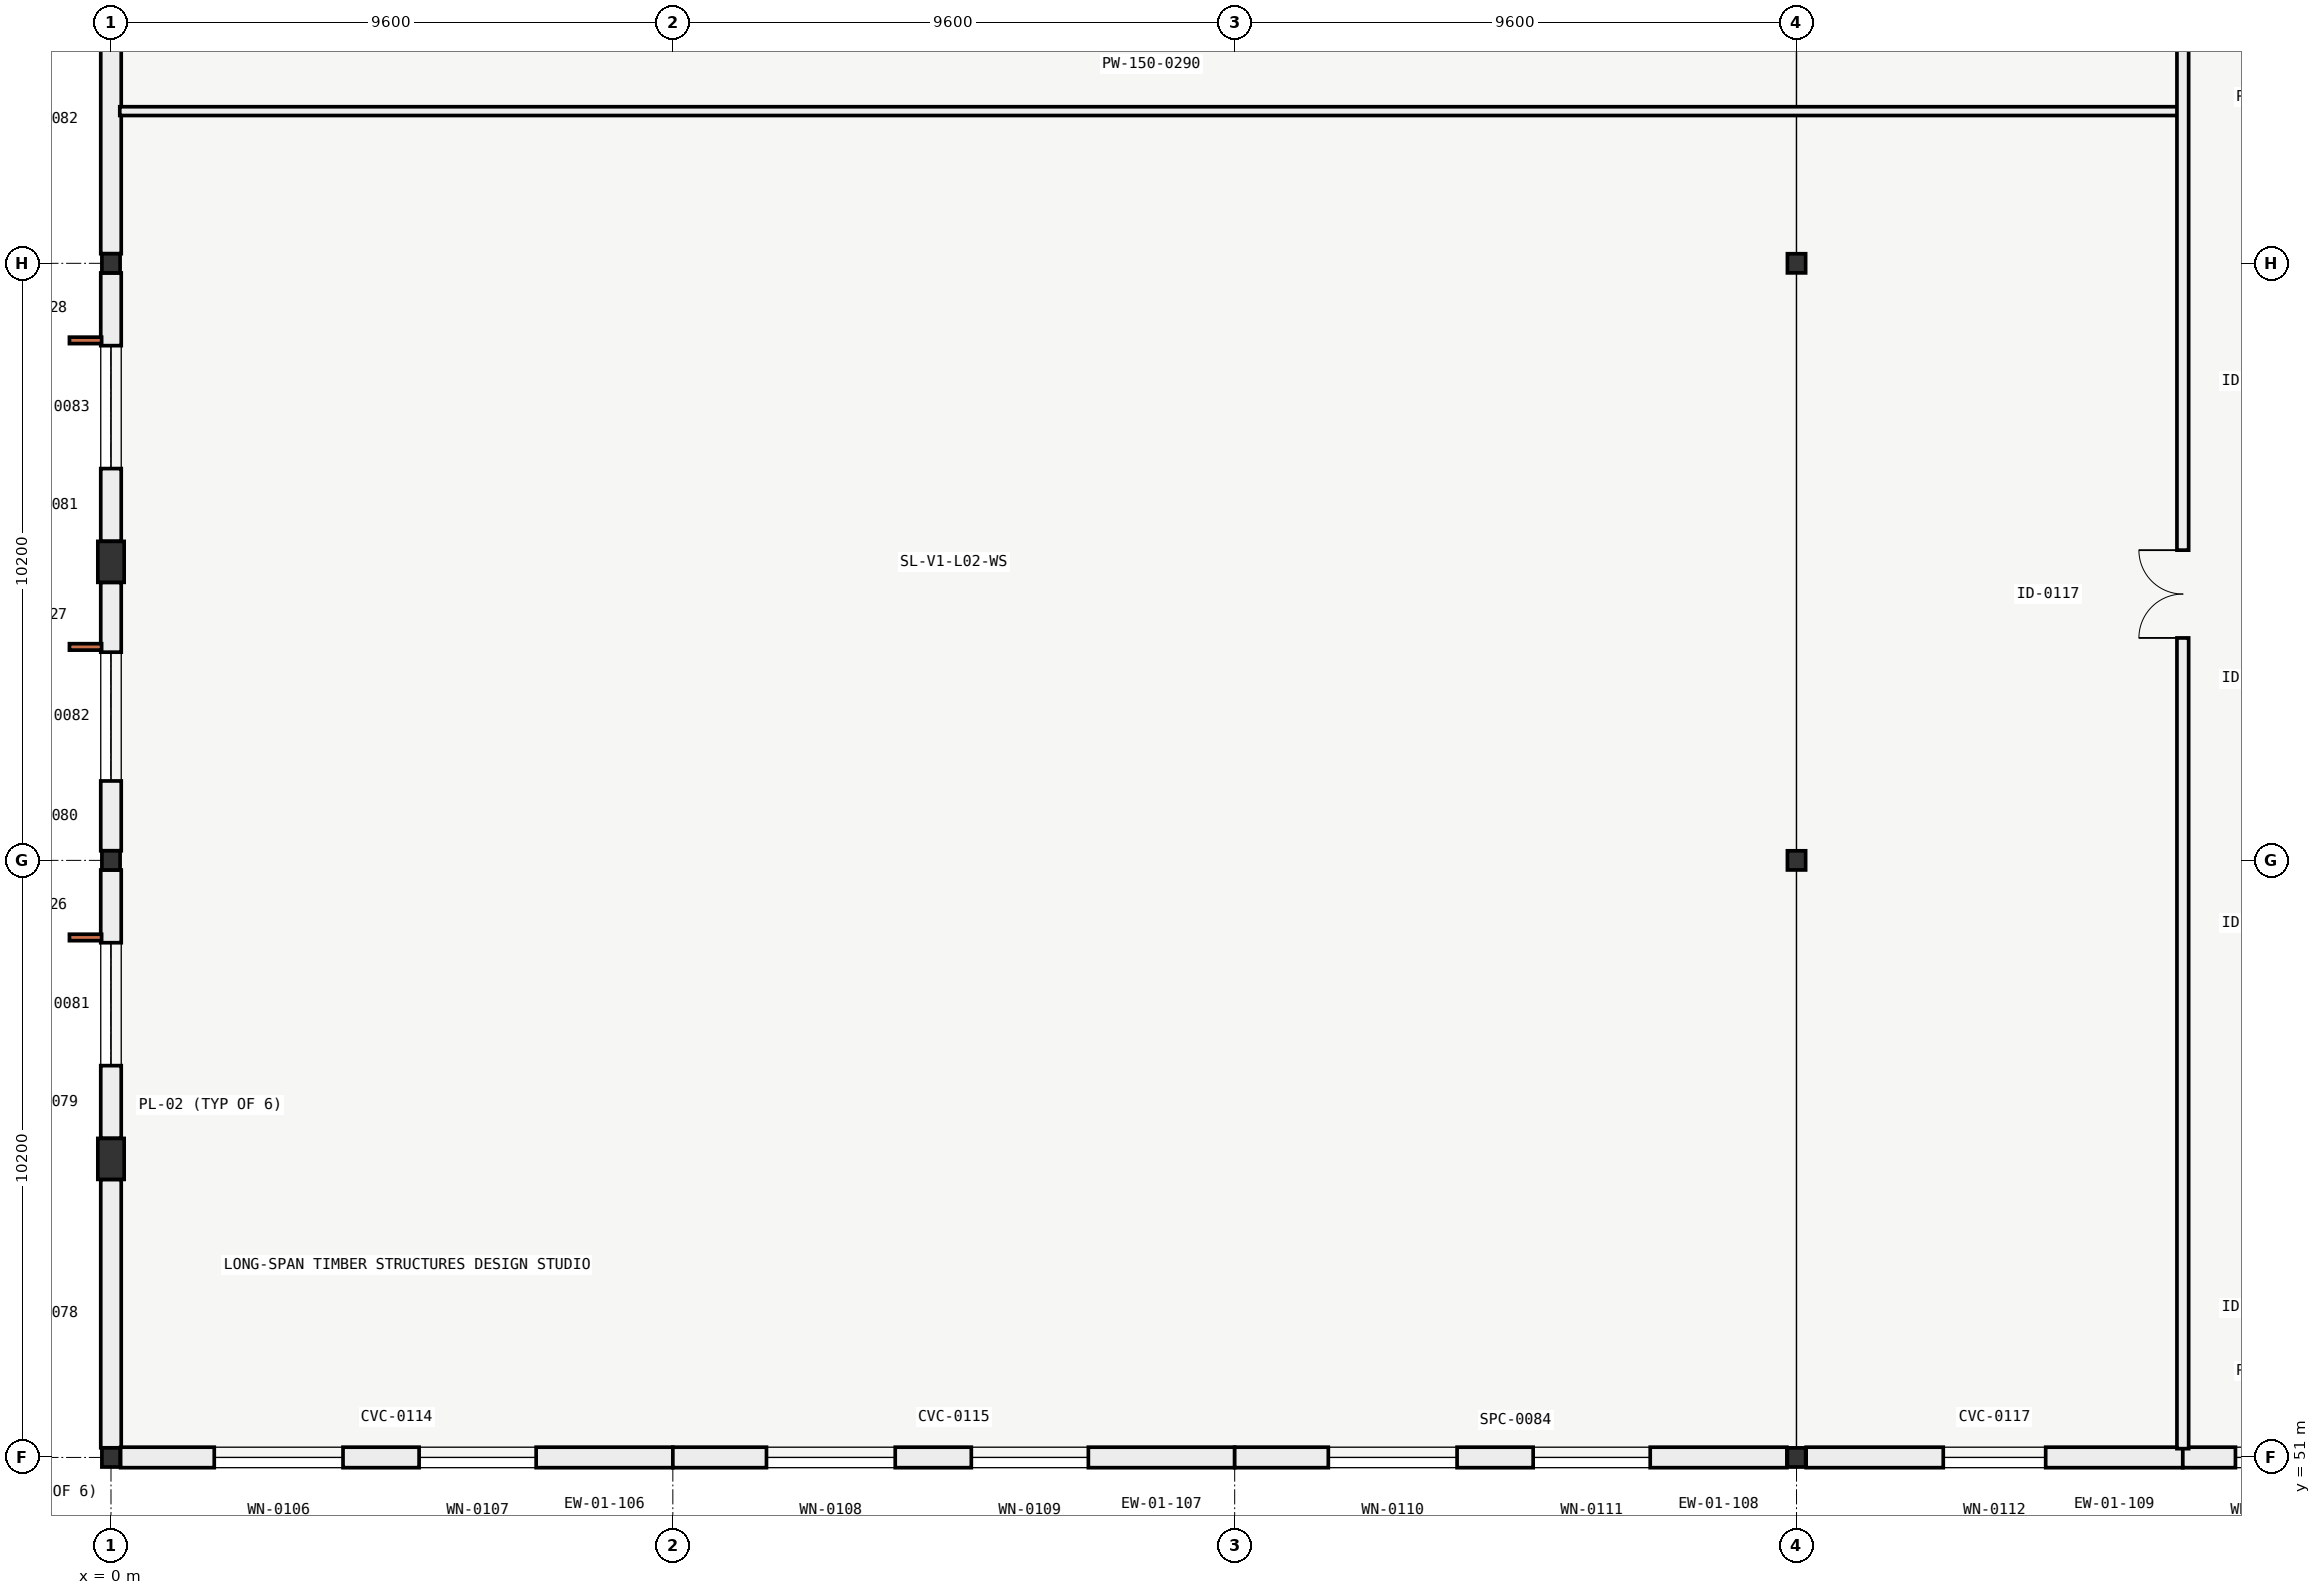
"""IFC4 building model, lengths in metres.
Left out: names, types, materials, properties, quantities, classifications, styles, units other than length and angle.
Written with IfcOpenShell. Run it as: python <this file> out.ifc"""

import sys

from ifc_helpers import new_model, si_unit, direction, frame, frame_2d, origin, origin_2d, place, context, subcontext, project, spatial, rectangle, i_section, extrude, element, fill, save


model = new_model("IFC4")
c1 = context("Model", 3, precision=1e-05, world=origin(), true_north=direction((0.0, 1.0)))
c2 = subcontext(c1, "Body", "Model", "MODEL_VIEW")
j1 = project(units=[si_unit("LENGTHUNIT", "METRE"), si_unit("PLANEANGLEUNIT", "RADIAN")], contexts=[c1])
p1 = place(None, origin())
s1 = spatial("IfcSite", under=j1, at=p1, CompositionType="ELEMENT")
p2 = place(p1, origin())
s2 = spatial("IfcBuilding", under=s1, at=p2, CompositionType="ELEMENT")
p3 = place(p2, frame((0.0, 0.0, 9.6)))
s3 = spatial("IfcBuildingStorey", under=s2, at=p3, CompositionType="ELEMENT", Elevation=9.6)
for number, where, z_axis, x_axis in (
    (1, (0.0, 51.0, 0.0), (0.0, 0.0, 1.0), (1.0, 0.0, 0.0)),
    (2, (28.8, 51.0, 0.0), (0.0, 0.0, 1.0), (1.0, 0.0, 0.0)),
    (3, (0.0, 61.2, 0.0), (0.0, 0.0, 1.0), (1.0, 0.0, 0.0)),
    (4, (28.8, 61.2, 0.0), (0.0, 0.0, 1.0), (1.0, 0.0, 0.0)),
    (5, (0.0, 71.4, 0.0), (0.0, 0.0, 1.0), (1.0, 0.0, 0.0)),
    (6, (28.8, 71.4, 0.0), (0.0, 0.0, 1.0), (1.0, 0.0, 0.0)),
):
    element("IfcColumn", number, at=place(p3, frame(where, z_axis=z_axis, x_axis=x_axis)), inside=s3, PredefinedType="COLUMN", context=c2, shape_type="SweptSolid", body=[
        extrude(i_section(OverallWidth=0.311, OverallDepth=0.327, WebThickness=0.016, FlangeThickness=0.025, FilletRadius=0.017, at=origin_2d()), origin(), (0.0, 0.0, 1.0), 4.2),
    ])
for number, where, z_axis, x_axis in (
    (7, (0.0, 56.1, 0.0), (0.0, 0.0, 1.0), (1.0, 0.0, 0.0)),
    (8, (0.0, 66.3, 0.0), (0.0, 0.0, 1.0), (1.0, 0.0, 0.0)),
):
    element("IfcColumn", number, at=place(p3, frame(where, z_axis=z_axis, x_axis=x_axis)), inside=s3, PredefinedType="PILASTER", context=c2, shape_type="SweptSolid", body=[
        extrude(rectangle(XDim=0.45, YDim=0.7, at=origin_2d()), origin(), (0.0, 0.0, 1.0), 4.2),
    ])
p4 = place(p3, frame((0.0, 51.165, 0.0), z_axis=(0.0, 0.0, 1.0), x_axis=(0.0, 1.0, 0.0)))
e9 = element("IfcWall", 9, at=p4, inside=s3, PredefinedType="SOLIDWALL", context=c2, shape_type="SweptSolid", body=[
    extrude(rectangle(XDim=4.584, YDim=0.35, at=frame_2d((2.292, 0.0))), origin(), (0.0, 0.0, 1.0), 3.48),
])
p5 = place(p3, frame((0.0, 56.451, 0.0), z_axis=(0.0, 0.0, 1.0), x_axis=(0.0, 1.0, 0.0)))
e10 = element("IfcWall", 10, at=p5, inside=s3, PredefinedType="SOLIDWALL", context=c2, shape_type="SweptSolid", body=[
    extrude(rectangle(XDim=4.584, YDim=0.35, at=frame_2d((2.292, 0.0))), origin(), (0.0, 0.0, 1.0), 3.48),
])
p6 = place(p5, frame((1.242, 0.0, 0.85)))
e11 = element("IfcOpeningElement", 11, at=p6, cuts=e10, PredefinedType="OPENING", context=c2, shape_type="SweptSolid", body=[
    extrude(rectangle(XDim=2.1, YDim=2.4, at=frame_2d((1.05, 1.2))), frame((0.0, 0.185, 0.0), z_axis=(0.0, -1.0, 0.0), x_axis=(1.0, 0.0, 0.0)), (0.0, 0.0, 1.0), 0.37),
])
p7 = place(p3, frame((0.0, 61.365, 0.0), z_axis=(0.0, 0.0, 1.0), x_axis=(0.0, 1.0, 0.0)))
e12 = element("IfcWall", 12, at=p7, inside=s3, PredefinedType="SOLIDWALL", context=c2, shape_type="SweptSolid", body=[
    extrude(rectangle(XDim=4.584, YDim=0.35, at=frame_2d((2.292, 0.0))), origin(), (0.0, 0.0, 1.0), 3.48),
])
p8 = place(p7, frame((1.192, 0.0, 0.85)))
e13 = element("IfcOpeningElement", 13, at=p8, cuts=e12, PredefinedType="OPENING", context=c2, shape_type="SweptSolid", body=[
    extrude(rectangle(XDim=2.2, YDim=2.3, at=frame_2d((1.1, 1.15))), frame((0.0, 0.185, 0.0), z_axis=(0.0, -1.0, 0.0), x_axis=(1.0, 0.0, 0.0)), (0.0, 0.0, 1.0), 0.37),
])
p9 = place(p3, frame((0.0, 66.651, 0.0), z_axis=(0.0, 0.0, 1.0), x_axis=(0.0, 1.0, 0.0)))
e14 = element("IfcWall", 14, at=p9, inside=s3, PredefinedType="SOLIDWALL", context=c2, shape_type="SweptSolid", body=[
    extrude(rectangle(XDim=4.585, YDim=0.35, at=frame_2d((2.292, 0.0))), origin(), (0.0, 0.0, 1.0), 3.48),
])
p10 = place(p9, frame((1.242, 0.0, 0.85)))
e15 = element("IfcOpeningElement", 15, at=p10, cuts=e14, PredefinedType="OPENING", context=c2, shape_type="SweptSolid", body=[
    extrude(rectangle(XDim=2.1, YDim=2.4, at=frame_2d((1.05, 1.2))), frame((0.0, 0.185, 0.0), z_axis=(0.0, -1.0, 0.0), x_axis=(1.0, 0.0, 0.0)), (0.0, 0.0, 1.0), 0.37),
])
p11 = place(p3, frame((0.0, 71.564, 0.0), z_axis=(0.0, 0.0, 1.0), x_axis=(0.0, 1.0, 0.0)))
e16 = element("IfcWall", 16, at=p11, inside=s3, PredefinedType="SOLIDWALL", context=c2, shape_type="SweptSolid", body=[
    extrude(rectangle(XDim=4.584, YDim=0.35, at=frame_2d((2.292, 0.0))), origin(), (0.0, 0.0, 1.0), 3.48),
])
p12 = place(p3, frame((9.6, 51.0, 0.0), z_axis=(0.0, 0.0, 1.0), x_axis=(-1.0, 0.0, 0.0)))
e17 = element("IfcWall", 17, at=p12, inside=s3, PredefinedType="SOLIDWALL", context=c2, shape_type="SweptSolid", body=[
    extrude(rectangle(XDim=9.436, YDim=0.35, at=frame_2d((4.718, 0.0))), origin(), (0.0, 0.0, 1.0), 3.32),
])
p13 = place(p12, frame((5.635, 0.0, 0.85)))
e18 = element("IfcOpeningElement", 18, at=p13, cuts=e17, PredefinedType="OPENING", context=c2, shape_type="SweptSolid", body=[
    extrude(rectangle(XDim=2.2, YDim=2.3, at=frame_2d((1.1, 1.15))), frame((0.0, 0.185, 0.0), z_axis=(0.0, -1.0, 0.0), x_axis=(1.0, 0.0, 0.0)), (0.0, 0.0, 1.0), 0.37),
])
p14 = place(p12, frame((2.335, 0.0, 0.85)))
e19 = element("IfcOpeningElement", 19, at=p14, cuts=e17, PredefinedType="OPENING", context=c2, shape_type="SweptSolid", body=[
    extrude(rectangle(XDim=2.0, YDim=1.35, at=frame_2d((1.0, 0.675))), frame((0.0, 0.185, 0.0), z_axis=(0.0, -1.0, 0.0), x_axis=(1.0, 0.0, 0.0)), (0.0, 0.0, 1.0), 0.37),
])
p15 = place(p3, frame((19.2, 51.0, 0.0), z_axis=(0.0, 0.0, 1.0), x_axis=(-1.0, 0.0, 0.0)))
e20 = element("IfcWall", 20, at=p15, inside=s3, PredefinedType="SOLIDWALL", context=c2, shape_type="SweptSolid", body=[
    extrude(rectangle(XDim=9.6, YDim=0.35, at=frame_2d((4.8, 0.0))), origin(), (0.0, 0.0, 1.0), 3.32),
])
p16 = place(p15, frame((5.8, 0.0, 0.85)))
e21 = element("IfcOpeningElement", 21, at=p16, cuts=e20, PredefinedType="OPENING", context=c2, shape_type="SweptSolid", body=[
    extrude(rectangle(XDim=2.2, YDim=2.3, at=frame_2d((1.1, 1.15))), frame((0.0, 0.185, 0.0), z_axis=(0.0, -1.0, 0.0), x_axis=(1.0, 0.0, 0.0)), (0.0, 0.0, 1.0), 0.37),
])
p17 = place(p15, frame((2.5, 0.0, 0.85)))
e22 = element("IfcOpeningElement", 22, at=p17, cuts=e20, PredefinedType="OPENING", context=c2, shape_type="SweptSolid", body=[
    extrude(rectangle(XDim=2.0, YDim=1.35, at=frame_2d((1.0, 0.675))), frame((0.0, 0.185, 0.0), z_axis=(0.0, -1.0, 0.0), x_axis=(1.0, 0.0, 0.0)), (0.0, 0.0, 1.0), 0.37),
])
p18 = place(p3, frame((28.635, 51.0, 0.0), z_axis=(0.0, 0.0, 1.0), x_axis=(-1.0, 0.0, 0.0)))
e23 = element("IfcWall", 23, at=p18, inside=s3, PredefinedType="SOLIDWALL", context=c2, shape_type="SweptSolid", body=[
    extrude(rectangle(XDim=9.436, YDim=0.35, at=frame_2d((4.718, 0.0))), origin(), (0.0, 0.0, 1.0), 3.32),
])
p19 = place(p18, frame((5.635, 0.0, 0.85)))
e24 = element("IfcOpeningElement", 24, at=p19, cuts=e23, PredefinedType="OPENING", context=c2, shape_type="SweptSolid", body=[
    extrude(rectangle(XDim=2.2, YDim=2.3, at=frame_2d((1.1, 1.15))), frame((0.0, 0.185, 0.0), z_axis=(0.0, -1.0, 0.0), x_axis=(1.0, 0.0, 0.0)), (0.0, 0.0, 1.0), 0.37),
])
p20 = place(p18, frame((2.335, 0.0, 0.85)))
e25 = element("IfcOpeningElement", 25, at=p20, cuts=e23, PredefinedType="OPENING", context=c2, shape_type="SweptSolid", body=[
    extrude(rectangle(XDim=2.0, YDim=1.35, at=frame_2d((1.0, 0.675))), frame((0.0, 0.185, 0.0), z_axis=(0.0, -1.0, 0.0), x_axis=(1.0, 0.0, 0.0)), (0.0, 0.0, 1.0), 0.37),
])
p21 = place(p3, frame((35.4, 51.0, 0.0), z_axis=(0.0, 0.0, 1.0), x_axis=(-1.0, 0.0, 0.0)))
e26 = element("IfcWall", 26, at=p21, inside=s3, PredefinedType="SOLIDWALL", context=c2, shape_type="SweptSolid", body=[
    extrude(rectangle(XDim=6.435, YDim=0.35, at=frame_2d((3.218, 0.0))), origin(), (0.0, 0.0, 1.0), 3.32),
])
p22 = place(p21, frame((2.343, 0.0, 0.9)))
e27 = element("IfcOpeningElement", 27, at=p22, cuts=e26, PredefinedType="OPENING", context=c2, shape_type="SweptSolid", body=[
    extrude(rectangle(XDim=1.75, YDim=2.05, at=frame_2d((0.875, 1.025))), frame((0.0, 0.185, 0.0), z_axis=(0.0, -1.0, 0.0), x_axis=(1.0, 0.0, 0.0)), (0.0, 0.0, 1.0), 0.37),
])
p23 = place(p3, frame((38.099, 51.0, 0.0), z_axis=(0.0, 0.0, 1.0), x_axis=(-1.0, 0.0, 0.0)))
e28 = element("IfcWall", 28, at=p23, inside=s3, PredefinedType="SOLIDWALL", context=c2, shape_type="SweptSolid", body=[
    extrude(rectangle(XDim=2.699, YDim=0.35, at=frame_2d((1.35, 0.0))), origin(), (0.0, 0.0, 1.0), 3.32),
])
p24 = place(p23, frame((0.899, 0.0, 0.85)))
e29 = element("IfcOpeningElement", 29, at=p24, cuts=e28, PredefinedType="OPENING", context=c2, shape_type="SweptSolid", body=[
    extrude(rectangle(XDim=0.9, YDim=2.2, at=frame_2d((0.45, 1.1))), frame((0.0, 0.185, 0.0), z_axis=(0.0, -1.0, 0.0), x_axis=(1.0, 0.0, 0.0)), (0.0, 0.0, 1.0), 0.37),
])
p25 = place(p3, frame((0.15, 74.0, 0.0), z_axis=(0.0, 0.0, 1.0), x_axis=(1.0, 0.0, 0.0)))
e30 = element("IfcWall", 30, at=p25, inside=s3, PredefinedType="PARTITIONING", context=c2, shape_type="SweptSolid", body=[
    extrude(rectangle(XDim=35.25, YDim=0.15, at=frame_2d((17.625, 0.0))), origin(), (0.0, 0.0, 1.0), 3.48),
])
p26 = place(p3, frame((35.4, 51.15, 0.0), z_axis=(0.0, 0.0, 1.0), x_axis=(0.0, 1.0, 0.0)))
e31 = element("IfcWall", 31, at=p26, inside=s3, PredefinedType="PARTITIONING", context=c2, shape_type="SweptSolid", body=[
    extrude(rectangle(XDim=71.1, YDim=0.2, at=frame_2d((35.55, 0.0))), origin(), (0.0, 0.0, 1.0), 3.61),
])
p27 = place(p26, frame((13.85, 0.0, 0.0)))
e32 = element("IfcOpeningElement", 32, at=p27, cuts=e31, PredefinedType="OPENING", context=c2, shape_type="SweptSolid", body=[
    extrude(rectangle(XDim=1.5, YDim=2.2, at=frame_2d((0.75, 1.1))), frame((0.0, 0.11, 0.0), z_axis=(0.0, -1.0, 0.0), x_axis=(1.0, 0.0, 0.0)), (0.0, 0.0, 1.0), 0.22),
])
p28 = place(p26, frame((35.35, 0.0, 0.0)))
e33 = element("IfcOpeningElement", 33, at=p28, cuts=e31, PredefinedType="OPENING", context=c2, shape_type="SweptSolid", body=[
    extrude(rectangle(XDim=2.0, YDim=2.4, at=frame_2d((1.0, 1.2))), frame((0.0, 0.11, 0.0), z_axis=(0.0, -1.0, 0.0), x_axis=(1.0, 0.0, 0.0)), (0.0, 0.0, 1.0), 0.22),
])
p29 = place(p26, frame((57.6, 0.0, 0.0)))
e34 = element("IfcOpeningElement", 34, at=p29, cuts=e31, PredefinedType="OPENING", context=c2, shape_type="SweptSolid", body=[
    extrude(rectangle(XDim=1.5, YDim=2.2, at=frame_2d((0.75, 1.1))), frame((0.0, 0.11, 0.0), z_axis=(0.0, -1.0, 0.0), x_axis=(1.0, 0.0, 0.0)), (0.0, 0.0, 1.0), 0.22),
])
p30 = place(p6, origin())
e35 = element("IfcWindow", 35, at=p30, inside=s3, PartitioningType="SINGLE_PANEL", PredefinedType="WINDOW", context=c2, shape_type="SweptSolid", body=[
    extrude(rectangle(XDim=2.1, YDim=2.4, at=frame_2d((1.05, 1.2))), frame((0.0, 0.03, 0.0), z_axis=(0.0, -1.0, 0.0), x_axis=(1.0, 0.0, 0.0)), (0.0, 0.0, 1.0), 0.06),
])
fill(e11, e35)
p31 = place(p8, origin())
e36 = element("IfcWindow", 36, at=p31, inside=s3, PartitioningType="SINGLE_PANEL", PredefinedType="WINDOW", context=c2, shape_type="SweptSolid", body=[
    extrude(rectangle(XDim=2.2, YDim=2.3, at=frame_2d((1.1, 1.15))), frame((0.0, 0.03, 0.0), z_axis=(0.0, -1.0, 0.0), x_axis=(1.0, 0.0, 0.0)), (0.0, 0.0, 1.0), 0.06),
])
fill(e13, e36)
p32 = place(p10, origin())
e37 = element("IfcWindow", 37, at=p32, inside=s3, PartitioningType="SINGLE_PANEL", PredefinedType="WINDOW", context=c2, shape_type="SweptSolid", body=[
    extrude(rectangle(XDim=2.1, YDim=2.4, at=frame_2d((1.05, 1.2))), frame((0.0, 0.03, 0.0), z_axis=(0.0, -1.0, 0.0), x_axis=(1.0, 0.0, 0.0)), (0.0, 0.0, 1.0), 0.06),
])
fill(e15, e37)
p33 = place(p13, origin())
e38 = element("IfcWindow", 38, at=p33, inside=s3, PartitioningType="SINGLE_PANEL", PredefinedType="WINDOW", context=c2, shape_type="SweptSolid", body=[
    extrude(rectangle(XDim=2.2, YDim=2.3, at=frame_2d((1.1, 1.15))), frame((0.0, 0.03, 0.0), z_axis=(0.0, -1.0, 0.0), x_axis=(1.0, 0.0, 0.0)), (0.0, 0.0, 1.0), 0.06),
])
fill(e18, e38)
p34 = place(p14, origin())
e39 = element("IfcWindow", 39, at=p34, inside=s3, PartitioningType="SINGLE_PANEL", PredefinedType="WINDOW", context=c2, shape_type="SweptSolid", body=[
    extrude(rectangle(XDim=2.0, YDim=1.35, at=frame_2d((1.0, 0.675))), frame((0.0, 0.03, 0.0), z_axis=(0.0, -1.0, 0.0), x_axis=(1.0, 0.0, 0.0)), (0.0, 0.0, 1.0), 0.06),
])
fill(e19, e39)
p35 = place(p16, origin())
e40 = element("IfcWindow", 40, at=p35, inside=s3, PartitioningType="SINGLE_PANEL", PredefinedType="WINDOW", context=c2, shape_type="SweptSolid", body=[
    extrude(rectangle(XDim=2.2, YDim=2.3, at=frame_2d((1.1, 1.15))), frame((0.0, 0.03, 0.0), z_axis=(0.0, -1.0, 0.0), x_axis=(1.0, 0.0, 0.0)), (0.0, 0.0, 1.0), 0.06),
])
fill(e21, e40)
p36 = place(p17, origin())
e41 = element("IfcWindow", 41, at=p36, inside=s3, PartitioningType="SINGLE_PANEL", PredefinedType="WINDOW", context=c2, shape_type="SweptSolid", body=[
    extrude(rectangle(XDim=2.0, YDim=1.35, at=frame_2d((1.0, 0.675))), frame((0.0, 0.03, 0.0), z_axis=(0.0, -1.0, 0.0), x_axis=(1.0, 0.0, 0.0)), (0.0, 0.0, 1.0), 0.06),
])
fill(e22, e41)
p37 = place(p19, origin())
e42 = element("IfcWindow", 42, at=p37, inside=s3, PartitioningType="SINGLE_PANEL", PredefinedType="WINDOW", context=c2, shape_type="SweptSolid", body=[
    extrude(rectangle(XDim=2.2, YDim=2.3, at=frame_2d((1.1, 1.15))), frame((0.0, 0.03, 0.0), z_axis=(0.0, -1.0, 0.0), x_axis=(1.0, 0.0, 0.0)), (0.0, 0.0, 1.0), 0.06),
])
fill(e24, e42)
p38 = place(p20, origin())
e43 = element("IfcWindow", 43, at=p38, inside=s3, PartitioningType="SINGLE_PANEL", PredefinedType="WINDOW", context=c2, shape_type="SweptSolid", body=[
    extrude(rectangle(XDim=2.0, YDim=1.35, at=frame_2d((1.0, 0.675))), frame((0.0, 0.03, 0.0), z_axis=(0.0, -1.0, 0.0), x_axis=(1.0, 0.0, 0.0)), (0.0, 0.0, 1.0), 0.06),
])
fill(e25, e43)
p39 = place(p22, origin())
e44 = element("IfcWindow", 44, at=p39, inside=s3, PartitioningType="SINGLE_PANEL", PredefinedType="WINDOW", context=c2, shape_type="SweptSolid", body=[
    extrude(rectangle(XDim=1.75, YDim=2.05, at=frame_2d((0.875, 1.025))), frame((0.0, 0.03, 0.0), z_axis=(0.0, -1.0, 0.0), x_axis=(1.0, 0.0, 0.0)), (0.0, 0.0, 1.0), 0.06),
])
fill(e27, e44)
p40 = place(p24, origin())
e45 = element("IfcWindow", 45, at=p40, inside=s3, PartitioningType="SINGLE_PANEL", PredefinedType="WINDOW", context=c2, shape_type="SweptSolid", body=[
    extrude(rectangle(XDim=0.9, YDim=2.2, at=frame_2d((0.45, 1.1))), frame((0.0, 0.03, 0.0), z_axis=(0.0, -1.0, 0.0), x_axis=(1.0, 0.0, 0.0)), (0.0, 0.0, 1.0), 0.06),
])
fill(e29, e45)
p41 = place(p27, origin())
e46 = element("IfcDoor", 46, at=p41, inside=s3, OperationType="DOUBLE_DOOR_SINGLE_SWING", PredefinedType="DOOR", context=c2, shape_type="SweptSolid", body=[
    extrude(rectangle(XDim=1.5, YDim=2.2, at=frame_2d((0.75, 1.1))), frame((0.0, 0.025, 0.0), z_axis=(0.0, -1.0, 0.0), x_axis=(1.0, 0.0, 0.0)), (0.0, 0.0, 1.0), 0.05),
])
fill(e32, e46)
save(model, sys.argv[1])
